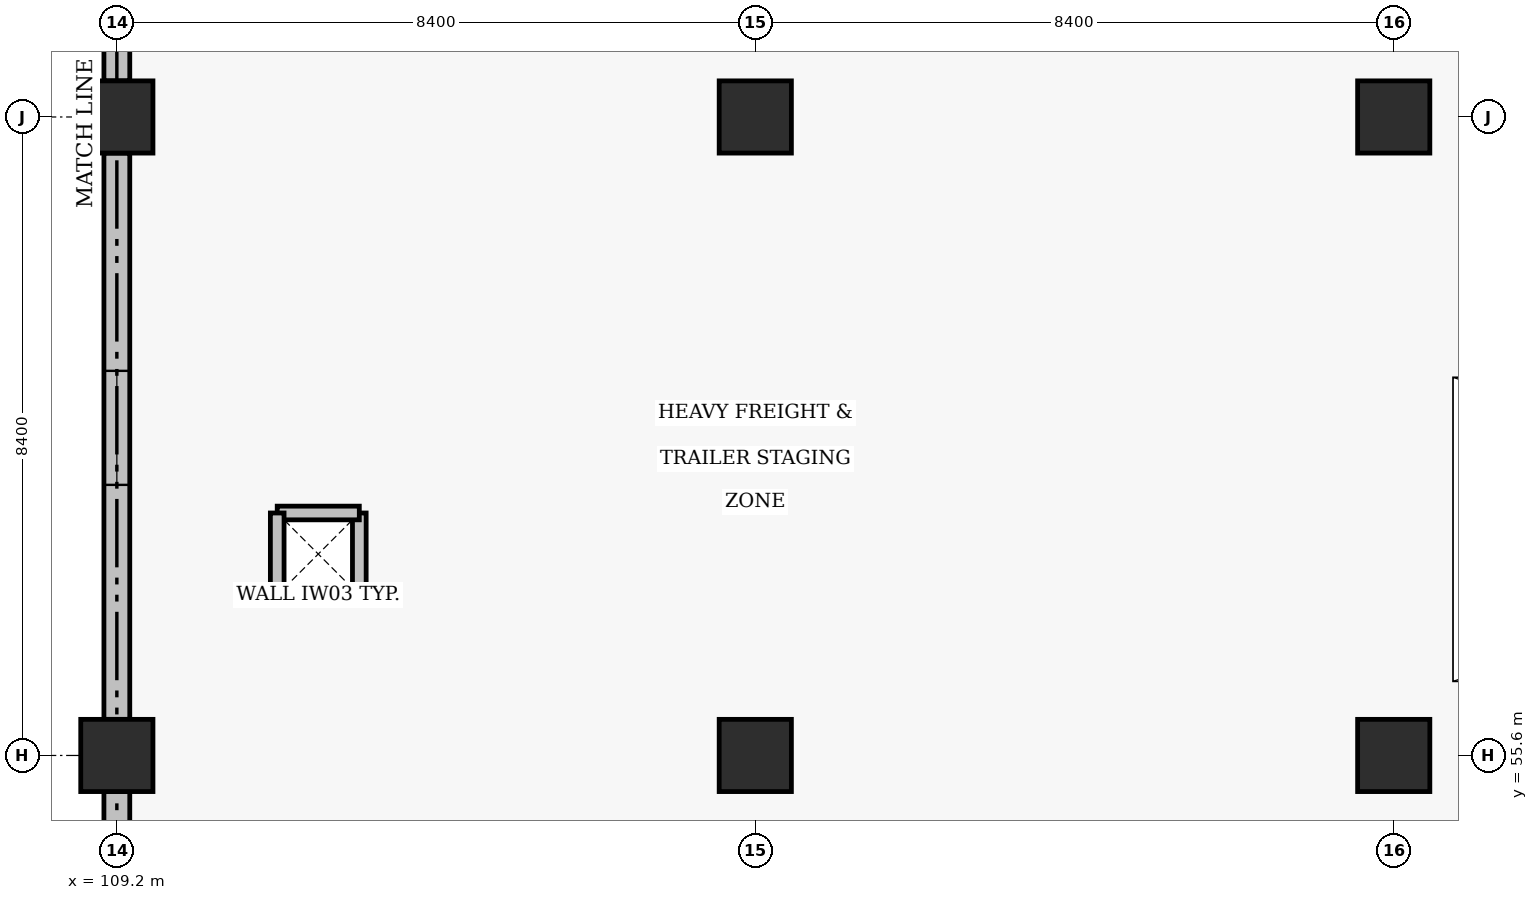
"""IFC4 building model, lengths in metres.
Left out: names, types, materials, properties, quantities, classifications, styles, units other than length and angle.
Written with IfcOpenShell. Run it as: python <this file> out.ifc"""

import sys

from ifc_helpers import new_model, si_unit, direction, frame, frame_2d, origin, origin_2d, place, context, subcontext, project, spatial, rectangle, extrude, element, fill, save


model = new_model("IFC4")
c1 = context("Model", 3, precision=1e-05, world=origin(), true_north=direction((0.0, 1.0)))
c2 = subcontext(c1, "Body", "Model", "MODEL_VIEW")
j1 = project(units=[si_unit("LENGTHUNIT", "METRE"), si_unit("PLANEANGLEUNIT", "RADIAN")], contexts=[c1])
p1 = place(None, origin())
s1 = spatial("IfcSite", under=j1, at=p1, CompositionType="ELEMENT")
p2 = place(p1, origin())
s2 = spatial("IfcBuilding", under=s1, at=p2, CompositionType="ELEMENT")
p3 = place(p2, origin())
s3 = spatial("IfcBuildingStorey", under=s2, at=p3, CompositionType="ELEMENT", Elevation=0.0)
for number, where, z_axis, x_axis in (
    (1, (109.2, 55.6, -0.46), (0.0, 0.0, 1.0), (1.0, 0.0, 0.0)),
    (2, (109.2, 64.0, -0.46), (0.0, 0.0, 1.0), (1.0, 0.0, 0.0)),
    (3, (117.6, 55.6, -0.46), (0.0, 0.0, 1.0), (1.0, 0.0, 0.0)),
    (4, (117.6, 64.0, -0.46), (0.0, 0.0, 1.0), (1.0, 0.0, 0.0)),
    (5, (126.0, 55.6, -0.46), (0.0, 0.0, 1.0), (1.0, 0.0, 0.0)),
    (6, (126.0, 64.0, -0.46), (0.0, 0.0, 1.0), (1.0, 0.0, 0.0)),
):
    element("IfcColumn", number, at=place(p3, frame(where, z_axis=z_axis, x_axis=x_axis)), inside=s3, PredefinedType="COLUMN", context=c2, shape_type="SweptSolid", body=[
        extrude(rectangle(XDim=0.95, YDim=0.95, at=origin_2d()), origin(), (0.0, 0.0, 1.0), 5.9),
    ])
p4 = place(p3, frame((109.2, 55.125, 0.0), z_axis=(0.0, 0.0, 1.0), x_axis=(0.0, -1.0, 0.0)))
e7 = element("IfcWall", 7, at=p4, inside=s3, PredefinedType="SOLIDWALL", context=c2, shape_type="SweptSolid", body=[
    extrude(rectangle(XDim=7.45, YDim=0.34, at=frame_2d((3.725, 0.0))), origin(), (0.0, 0.0, 1.0), 4.545),
])
p5 = place(p4, frame((2.865, 0.0, 1.35)))
e8 = element("IfcOpeningElement", 8, at=p5, cuts=e7, PredefinedType="OPENING", context=c2, shape_type="SweptSolid", body=[
    extrude(rectangle(XDim=1.5, YDim=1.1, at=frame_2d((0.75, 0.55))), frame((0.0, 0.18, 0.0), z_axis=(0.0, -1.0, 0.0), x_axis=(1.0, 0.0, 0.0)), (0.0, 0.0, 1.0), 0.36),
])
p6 = place(p3, frame((109.2, 63.525, 0.0), z_axis=(0.0, 0.0, 1.0), x_axis=(0.0, -1.0, 0.0)))
e9 = element("IfcWall", 9, at=p6, inside=s3, PredefinedType="SOLIDWALL", context=c2, shape_type="SweptSolid", body=[
    extrude(rectangle(XDim=7.45, YDim=0.34, at=frame_2d((3.725, 0.0))), origin(), (0.0, 0.0, 1.0), 4.545),
])
p7 = place(p6, frame((2.865, 0.0, 1.35)))
e10 = element("IfcOpeningElement", 10, at=p7, cuts=e9, PredefinedType="OPENING", context=c2, shape_type="SweptSolid", body=[
    extrude(rectangle(XDim=1.5, YDim=1.1, at=frame_2d((0.75, 0.55))), frame((0.0, 0.18, 0.0), z_axis=(0.0, -1.0, 0.0), x_axis=(1.0, 0.0, 0.0)), (0.0, 0.0, 1.0), 0.36),
])
p8 = place(p3, frame((109.2, 71.925, 0.0), z_axis=(0.0, 0.0, 1.0), x_axis=(0.0, -1.0, 0.0)))
e11 = element("IfcWall", 11, at=p8, inside=s3, PredefinedType="SOLIDWALL", context=c2, shape_type="SweptSolid", body=[
    extrude(rectangle(XDim=7.45, YDim=0.34, at=frame_2d((3.725, 0.0))), origin(), (0.0, 0.0, 1.0), 4.545),
])
p9 = place(p8, frame((2.865, 0.0, 1.35)))
e12 = element("IfcOpeningElement", 12, at=p9, cuts=e11, PredefinedType="OPENING", context=c2, shape_type="SweptSolid", body=[
    extrude(rectangle(XDim=1.5, YDim=1.1, at=frame_2d((0.75, 0.55))), frame((0.0, 0.18, 0.0), z_axis=(0.0, -1.0, 0.0), x_axis=(1.0, 0.0, 0.0)), (0.0, 0.0, 1.0), 0.36),
])
p10 = place(p3, frame((111.31, 57.71, 0.0), z_axis=(0.0, 0.0, 1.0), x_axis=(1.0, 0.0, 0.0)))
e13 = element("IfcWall", 13, at=p10, inside=s3, PredefinedType="SOLIDWALL", context=c2, shape_type="SweptSolid", body=[
    extrude(rectangle(XDim=1.08, YDim=0.18, at=frame_2d((0.54, 0.0))), origin(), (0.0, 0.0, 1.0), 2.6),
])
p11 = place(p3, frame((112.39, 57.71, 0.0), z_axis=(0.0, 0.0, 1.0), x_axis=(0.0, 1.0, 0.0)))
e14 = element("IfcWall", 14, at=p11, inside=s3, PredefinedType="SOLIDWALL", context=c2, shape_type="SweptSolid", body=[
    extrude(rectangle(XDim=1.08, YDim=0.18, at=frame_2d((0.54, 0.0))), origin(), (0.0, 0.0, 1.0), 2.6),
])
p12 = place(p3, frame((112.39, 58.79, 0.0), z_axis=(0.0, 0.0, 1.0), x_axis=(-1.0, 0.0, 0.0)))
e15 = element("IfcWall", 15, at=p12, inside=s3, PredefinedType="SOLIDWALL", context=c2, shape_type="SweptSolid", body=[
    extrude(rectangle(XDim=1.08, YDim=0.18, at=frame_2d((0.54, 0.0))), origin(), (0.0, 0.0, 1.0), 2.6),
])
p13 = place(p3, frame((111.31, 58.79, 0.0), z_axis=(0.0, 0.0, 1.0), x_axis=(0.0, -1.0, 0.0)))
e16 = element("IfcWall", 16, at=p13, inside=s3, PredefinedType="SOLIDWALL", context=c2, shape_type="SweptSolid", body=[
    extrude(rectangle(XDim=1.08, YDim=0.18, at=frame_2d((0.54, 0.0))), origin(), (0.0, 0.0, 1.0), 2.6),
])
p14 = place(p7, origin())
e17 = element("IfcWindow", 17, at=p14, inside=s3, PartitioningType="SINGLE_PANEL", PredefinedType="WINDOW", context=c2, shape_type="SweptSolid", body=[
    extrude(rectangle(XDim=1.5, YDim=1.1, at=frame_2d((0.75, 0.55))), frame((0.0, 0.03, 0.0), z_axis=(0.0, -1.0, 0.0), x_axis=(1.0, 0.0, 0.0)), (0.0, 0.0, 1.0), 0.06),
])
fill(e10, e17)
save(model, sys.argv[1])
